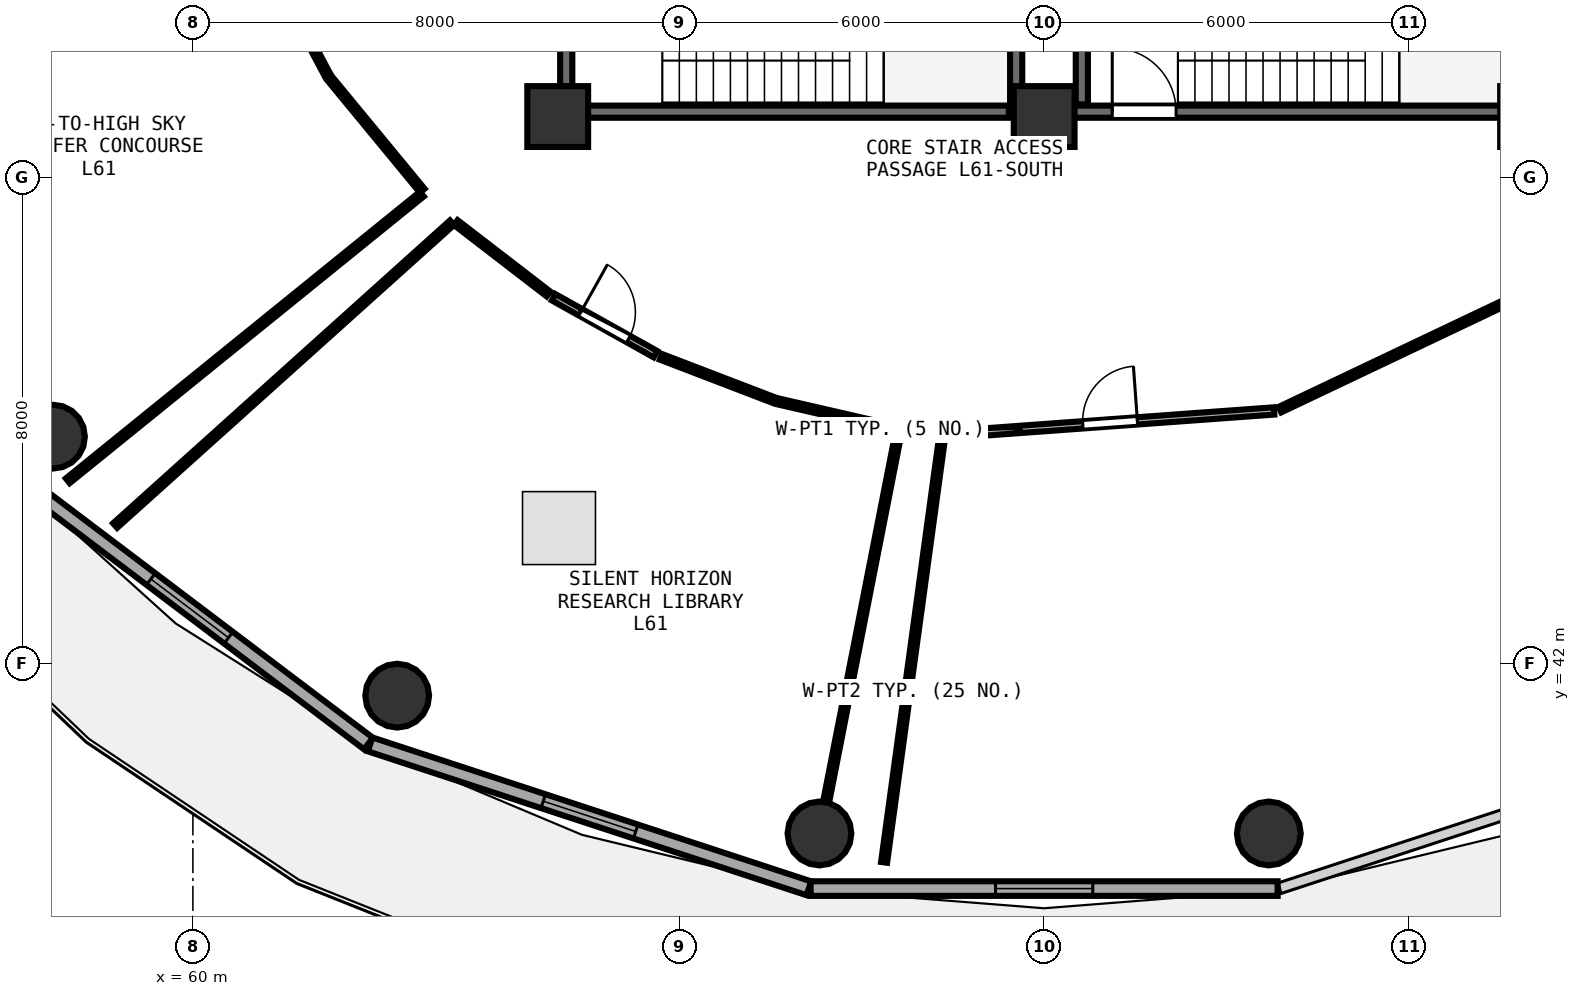
"""IFC4 building model, lengths in metres.
Left out: names, types, materials, properties, quantities, classifications, styles, units other than length and angle.
Written with IfcOpenShell. Run it as: python <this file> out.ifc"""

import sys

from ifc_helpers import new_model, si_unit, direction, frame, frame_2d, origin, origin_2d, place, context, subcontext, project, spatial, rectangle, circle, extrude, element, fill, save


model = new_model("IFC4")
c1 = context("Model", 3, precision=1e-05, world=origin(), true_north=direction((0.0, 1.0)))
c2 = subcontext(c1, "Body", "Model", "MODEL_VIEW")
j1 = project(units=[si_unit("LENGTHUNIT", "METRE"), si_unit("PLANEANGLEUNIT", "RADIAN")], contexts=[c1])
p1 = place(None, origin())
s1 = spatial("IfcSite", under=j1, at=p1, CompositionType="ELEMENT")
p2 = place(p1, origin())
s2 = spatial("IfcBuilding", under=s1, at=p2, CompositionType="ELEMENT")
p3 = place(p2, frame((0.0, 0.0, 238.2)))
s3 = spatial("IfcBuildingStorey", under=s2, at=p3, CompositionType="ELEMENT", Elevation=238.2)
for number, where, z_axis, x_axis in (
    (1, (66.0, 51.0, 0.0), (0.0, 0.0, 1.0), (1.0, 0.0, 0.0)),
    (2, (74.0, 51.0, 0.0), (0.0, 0.0, 1.0), (1.0, 0.0, 0.0)),
):
    element("IfcColumn", number, at=place(p3, frame(where, z_axis=z_axis, x_axis=x_axis)), inside=s3, PredefinedType="PILASTER", context=c2, shape_type="SweptSolid", body=[
        extrude(rectangle(XDim=1.0, YDim=1.0, at=origin_2d()), origin(), (0.0, 0.0, 1.0), 4.76),
    ])
for number, where, z_axis, x_axis in (
    (3, (57.698, 45.736, 0.0), (0.0, 0.0, 1.0), (1.0, 0.0, 0.0)),
    (4, (63.36, 41.476, 0.0), (0.0, 0.0, 1.0), (1.0, 0.0, 0.0)),
    (5, (70.305, 39.21, 0.0), (0.0, 0.0, 1.0), (1.0, 0.0, 0.0)),
    (6, (77.695, 39.21, 0.0), (0.0, 0.0, 1.0), (1.0, 0.0, 0.0)),
):
    element("IfcColumn", number, at=place(p3, frame(where, z_axis=z_axis, x_axis=x_axis)), inside=s3, PredefinedType="COLUMN", context=c2, shape_type="SweptSolid", body=[
        extrude(circle(Radius=0.525, at=origin_2d()), origin(), (0.0, 0.0, 1.0), 4.76),
    ])
p4 = place(p3, frame((57.006, 45.135, 0.0), z_axis=(0.0, 0.0, 1.0), x_axis=(0.797701674595, -0.603052268338, 0.0)))
e7 = element("IfcWall", 7, at=p4, inside=s3, PredefinedType="SOLIDWALL", context=c2, shape_type="SweptSolid", body=[
    extrude(rectangle(XDim=7.374, YDim=0.24, at=frame_2d((3.687, 0.0))), origin(), (0.0, 0.0, 1.0), 4.345),
])
p5 = place(p4, frame((2.887, 0.0, 0.85)))
e8 = element("IfcOpeningElement", 8, at=p5, cuts=e7, PredefinedType="OPENING", context=c2, shape_type="SweptSolid", body=[
    extrude(rectangle(XDim=1.6, YDim=1.45, at=frame_2d((0.8, 0.725))), frame((0.0, 0.13, 0.0), z_axis=(0.0, -1.0, 0.0), x_axis=(1.0, 0.0, 0.0)), (0.0, 0.0, 1.0), 0.26),
])
p6 = place(p3, frame((62.914, 40.675, 0.0), z_axis=(0.0, 0.0, 1.0), x_axis=(0.95022142767, -0.31157541366, 0.0)))
e9 = element("IfcWall", 9, at=p6, inside=s3, PredefinedType="SOLIDWALL", context=c2, shape_type="SweptSolid", body=[
    extrude(rectangle(XDim=7.594, YDim=0.24, at=frame_2d((3.797, 0.0))), origin(), (0.0, 0.0, 1.0), 4.345),
])
p7 = place(p6, frame((2.997, 0.0, 0.85)))
e10 = element("IfcOpeningElement", 10, at=p7, cuts=e9, PredefinedType="OPENING", context=c2, shape_type="SweptSolid", body=[
    extrude(rectangle(XDim=1.6, YDim=1.45, at=frame_2d((0.8, 0.725))), frame((0.0, 0.13, 0.0), z_axis=(0.0, -1.0, 0.0), x_axis=(1.0, 0.0, 0.0)), (0.0, 0.0, 1.0), 0.26),
])
p8 = place(p3, frame((70.16, 38.304, 0.0), z_axis=(0.0, 0.0, 1.0), x_axis=(1.0, 0.0, 0.0)))
e11 = element("IfcWall", 11, at=p8, inside=s3, PredefinedType="SOLIDWALL", context=c2, shape_type="SweptSolid", body=[
    extrude(rectangle(XDim=7.68, YDim=0.24, at=frame_2d((3.84, 0.0))), origin(), (0.0, 0.0, 1.0), 4.345),
])
p9 = place(p8, frame((3.04, 0.0, 0.85)))
e12 = element("IfcOpeningElement", 12, at=p9, cuts=e11, PredefinedType="OPENING", context=c2, shape_type="SweptSolid", body=[
    extrude(rectangle(XDim=1.6, YDim=1.45, at=frame_2d((0.8, 0.725))), frame((0.0, 0.13, 0.0), z_axis=(0.0, -1.0, 0.0), x_axis=(1.0, 0.0, 0.0)), (0.0, 0.0, 1.0), 0.26),
])
p10 = place(p3, frame((74.0, 51.08, 0.0), z_axis=(0.0, 0.0, 1.0), x_axis=(1.0, 0.0, 0.0)))
e13 = element("IfcWall", 13, at=p10, inside=s3, PredefinedType="SHEAR", context=c2, shape_type="SweptSolid", body=[
    extrude(rectangle(XDim=7.9, YDim=0.2, at=frame_2d((3.95, 0.0))), origin(), (0.0, 0.0, 1.0), 4.36),
])
p11 = place(p10, frame((1.12, 0.0, 0.0)))
e14 = element("IfcOpeningElement", 14, at=p11, cuts=e13, PredefinedType="OPENING", context=c2, shape_type="SweptSolid", body=[
    extrude(rectangle(XDim=1.05, YDim=2.1, at=frame_2d((0.525, 1.05))), frame((0.0, 0.11, 0.0), z_axis=(0.0, -1.0, 0.0), x_axis=(1.0, 0.0, 0.0)), (0.0, 0.0, 1.0), 0.22),
])
p12 = place(p3, frame((74.62, 54.27, 0.0), z_axis=(0.0, 0.0, 1.0), x_axis=(0.0, -1.0, 0.0)))
e15 = element("IfcWall", 15, at=p12, inside=s3, PredefinedType="SHEAR", context=c2, shape_type="SweptSolid", body=[
    extrude(rectangle(XDim=3.07, YDim=0.2, at=frame_2d((1.535, 0.0))), origin(), (0.0, 0.0, 1.0), 4.36),
])
p13 = place(p3, frame((66.26, 51.08, 0.0), z_axis=(0.0, 0.0, 1.0), x_axis=(1.0, 0.0, 0.0)))
e16 = element("IfcWall", 16, at=p13, inside=s3, PredefinedType="SHEAR", context=c2, shape_type="SweptSolid", body=[
    extrude(rectangle(XDim=7.16, YDim=0.2, at=frame_2d((3.58, 0.0))), origin(), (0.0, 0.0, 1.0), 4.36),
])
p14 = place(p3, frame((73.54, 51.2, 0.0), z_axis=(0.0, 0.0, 1.0), x_axis=(0.0, 1.0, 0.0)))
e17 = element("IfcWall", 17, at=p14, inside=s3, PredefinedType="SHEAR", context=c2, shape_type="SweptSolid", body=[
    extrude(rectangle(XDim=3.07, YDim=0.2, at=frame_2d((1.535, 0.0))), origin(), (0.0, 0.0, 1.0), 4.36),
])
p15 = place(p3, frame((66.14, 54.27, 0.0), z_axis=(0.0, 0.0, 1.0), x_axis=(0.0, -1.0, 0.0)))
e18 = element("IfcWall", 18, at=p15, inside=s3, PredefinedType="SHEAR", context=c2, shape_type="SweptSolid", body=[
    extrude(rectangle(XDim=3.07, YDim=0.2, at=frame_2d((1.535, 0.0))), origin(), (0.0, 0.0, 1.0), 4.36),
])
p16 = place(p15, frame((1.01, 0.0, 0.0)))
e19 = element("IfcOpeningElement", 19, at=p16, cuts=e18, PredefinedType="OPENING", context=c2, shape_type="SweptSolid", body=[
    extrude(rectangle(XDim=1.05, YDim=2.1, at=frame_2d((0.525, 1.05))), frame((0.0, 0.11, 0.0), z_axis=(0.0, -1.0, 0.0), x_axis=(1.0, 0.0, 0.0)), (0.0, 0.0, 1.0), 0.22),
])
p17 = place(p3, frame((65.933, 48.028, 0.0), z_axis=(0.0, 0.0, 1.0), x_axis=(0.873020002145, -0.487684401898, 0.0)))
e20 = element("IfcWall", 20, at=p17, inside=s3, PredefinedType="PARTITIONING", context=c2, shape_type="SweptSolid", body=[
    extrude(rectangle(XDim=1.918, YDim=0.12, at=frame_2d((0.959, 0.0))), origin(), (0.0, 0.0, 1.0), 2.345),
])
p18 = place(p17, frame((0.509, 0.0, 0.0)))
e21 = element("IfcOpeningElement", 21, at=p18, cuts=e20, PredefinedType="OPENING", context=c2, shape_type="SweptSolid", body=[
    extrude(rectangle(XDim=0.9, YDim=2.08, at=frame_2d((0.45, 1.04))), frame((0.0, 0.07, 0.0), z_axis=(0.0, -1.0, 0.0), x_axis=(1.0, 0.0, 0.0)), (0.0, 0.0, 1.0), 0.14),
])
p19 = place(p3, frame((72.387, 45.766, 0.0), z_axis=(0.0, 0.0, 1.0), x_axis=(0.997366707309, 0.072523452427, 0.0)))
e22 = element("IfcWall", 22, at=p19, inside=s3, PredefinedType="PARTITIONING", context=c2, shape_type="SweptSolid", body=[
    extrude(rectangle(XDim=5.41, YDim=0.12, at=frame_2d((2.705, 0.0))), origin(), (0.0, 0.0, 1.0), 2.345),
])
p20 = place(p19, frame((2.255, 0.0, 0.0)))
e23 = element("IfcOpeningElement", 23, at=p20, cuts=e22, PredefinedType="OPENING", context=c2, shape_type="SweptSolid", body=[
    extrude(rectangle(XDim=0.9, YDim=2.08, at=frame_2d((0.45, 1.04))), frame((0.0, 0.07, 0.0), z_axis=(0.0, -1.0, 0.0), x_axis=(1.0, 0.0, 0.0)), (0.0, 0.0, 1.0), 0.14),
])
p21 = place(p3, frame((61.117, 53.748, 0.0), z_axis=(0.0, 0.0, 1.0), x_axis=(0.469073693437, -0.883159028785, 0.0)))
e24 = element("IfcWall", 24, at=p21, inside=s3, PredefinedType="PARTITIONING", context=c2, shape_type="SweptSolid", body=[
    extrude(rectangle(XDim=2.335, YDim=0.1, at=frame_2d((1.168, 0.0))), origin(), (0.0, 0.0, 1.0), 2.345),
])
p22 = place(p3, frame((62.256, 51.619, 0.0), z_axis=(0.0, 0.0, 1.0), x_axis=(0.636052062508, -0.771646145444, 0.0)))
e25 = element("IfcWall", 25, at=p22, inside=s3, PredefinedType="PARTITIONING", context=c2, shape_type="SweptSolid", body=[
    extrude(rectangle(XDim=2.382, YDim=0.1, at=frame_2d((1.191, 0.0))), origin(), (0.0, 0.0, 1.0), 2.345),
])
p23 = place(p3, frame((63.766, 49.725, 0.0), z_axis=(0.0, 0.0, 1.0), x_axis=(-0.777235006442, -0.629210413742, 0.0)))
e26 = element("IfcWall", 26, at=p23, inside=s3, PredefinedType="PARTITIONING", context=c2, shape_type="SweptSolid", body=[
    extrude(rectangle(XDim=7.493, YDim=0.1, at=frame_2d((3.747, 0.0))), origin(), (0.0, 0.0, 1.0), 2.345),
])
p24 = place(p3, frame((64.323, 49.257, 0.0), z_axis=(0.0, 0.0, 1.0), x_axis=(0.792378964909, -0.610029159934, 0.0)))
e27 = element("IfcWall", 27, at=p24, inside=s3, PredefinedType="PARTITIONING", context=c2, shape_type="SweptSolid", body=[
    extrude(rectangle(XDim=1.927, YDim=0.1, at=frame_2d((0.963, 0.0))), origin(), (0.0, 0.0, 1.0), 2.345),
])
p25 = place(p3, frame((67.697, 47.049, 0.0), z_axis=(0.0, 0.0, 1.0), x_axis=(0.933735149574, -0.357964621786, 0.0)))
e28 = element("IfcWall", 28, at=p25, inside=s3, PredefinedType="PARTITIONING", context=c2, shape_type="SweptSolid", body=[
    extrude(rectangle(XDim=1.984, YDim=0.1, at=frame_2d((0.992, 0.0))), origin(), (0.0, 0.0, 1.0), 4.35),
])
p26 = place(p3, frame((69.626, 46.315, 0.0), z_axis=(0.0, 0.0, 1.0), x_axis=(0.974526673994, -0.224271624762, 0.0)))
e29 = element("IfcWall", 29, at=p26, inside=s3, PredefinedType="PARTITIONING", context=c2, shape_type="SweptSolid", body=[
    extrude(rectangle(XDim=2.002, YDim=0.1, at=frame_2d((1.001, 0.0))), origin(), (0.0, 0.0, 1.0), 4.35),
])
p27 = place(p3, frame((71.608, 45.818, 0.0), z_axis=(0.0, 0.0, 1.0), x_axis=(-0.19242564028, -0.981311557541, 0.0)))
e30 = element("IfcWall", 30, at=p27, inside=s3, PredefinedType="PARTITIONING", context=c2, shape_type="SweptSolid", body=[
    extrude(rectangle(XDim=6.185, YDim=0.1, at=frame_2d((3.093, 0.0))), origin(), (0.0, 0.0, 1.0), 2.345),
])
p28 = place(p3, frame((58.721, 44.274, 0.0), z_axis=(0.0, 0.0, 1.0), x_axis=(0.743678571083, 0.668537345936, 0.0)))
e31 = element("IfcWall", 31, at=p28, inside=s3, PredefinedType="PARTITIONING", context=c2, shape_type="SweptSolid", body=[
    extrude(rectangle(XDim=7.45, YDim=0.1, at=frame_2d((3.725, 0.0))), origin(), (0.0, 0.0, 1.0), 2.345),
])
p29 = place(p3, frame((77.878, 46.18, 0.0), z_axis=(0.0, 0.0, 1.0), x_axis=(0.903304994033, 0.428998936775, 0.0)))
e32 = element("IfcWall", 32, at=p29, inside=s3, PredefinedType="PARTITIONING", context=c2, shape_type="SweptSolid", body=[
    extrude(rectangle(XDim=5.335, YDim=0.1, at=frame_2d((2.667, 0.0))), origin(), (0.0, 0.0, 1.0), 2.345),
])
p30 = place(p3, frame((71.367, 38.735, 0.0), z_axis=(0.0, 0.0, 1.0), x_axis=(0.135283127844, 0.990806981869, 0.0)))
e33 = element("IfcWall", 33, at=p30, inside=s3, PredefinedType="PARTITIONING", context=c2, shape_type="SweptSolid", body=[
    extrude(rectangle(XDim=7.053, YDim=0.1, at=frame_2d((3.526, 0.0))), origin(), (0.0, 0.0, 1.0), 2.345),
])
p31 = place(p5, origin())
e34 = element("IfcWindow", 34, at=p31, inside=s3, PartitioningType="SINGLE_PANEL", PredefinedType="WINDOW", context=c2, shape_type="SweptSolid", body=[
    extrude(rectangle(XDim=1.6, YDim=1.45, at=frame_2d((0.8, 0.725))), frame((0.0, 0.03, 0.0), z_axis=(0.0, -1.0, 0.0), x_axis=(1.0, 0.0, 0.0)), (0.0, 0.0, 1.0), 0.06),
])
fill(e8, e34)
p32 = place(p7, origin())
e35 = element("IfcWindow", 35, at=p32, inside=s3, PartitioningType="SINGLE_PANEL", PredefinedType="WINDOW", context=c2, shape_type="SweptSolid", body=[
    extrude(rectangle(XDim=1.6, YDim=1.45, at=frame_2d((0.8, 0.725))), frame((0.0, 0.03, 0.0), z_axis=(0.0, -1.0, 0.0), x_axis=(1.0, 0.0, 0.0)), (0.0, 0.0, 1.0), 0.06),
])
fill(e10, e35)
p33 = place(p9, origin())
e36 = element("IfcWindow", 36, at=p33, inside=s3, PartitioningType="SINGLE_PANEL", PredefinedType="WINDOW", context=c2, shape_type="SweptSolid", body=[
    extrude(rectangle(XDim=1.6, YDim=1.45, at=frame_2d((0.8, 0.725))), frame((0.0, 0.03, 0.0), z_axis=(0.0, -1.0, 0.0), x_axis=(1.0, 0.0, 0.0)), (0.0, 0.0, 1.0), 0.06),
])
fill(e12, e36)
p34 = place(p11, origin())
e37 = element("IfcDoor", 37, at=p34, inside=s3, OperationType="SINGLE_SWING_LEFT", PredefinedType="DOOR", context=c2, shape_type="SweptSolid", body=[
    extrude(rectangle(XDim=1.05, YDim=2.1, at=frame_2d((0.525, 1.05))), frame((0.0, 0.025, 0.0), z_axis=(0.0, -1.0, 0.0), x_axis=(1.0, 0.0, 0.0)), (0.0, 0.0, 1.0), 0.05),
])
fill(e14, e37)
p35 = place(p18, origin())
e38 = element("IfcDoor", 38, at=p35, inside=s3, OperationType="SINGLE_SWING_LEFT", PredefinedType="DOOR", context=c2, shape_type="SweptSolid", body=[
    extrude(rectangle(XDim=0.9, YDim=2.08, at=frame_2d((0.45, 1.04))), frame((0.0, 0.025, 0.0), z_axis=(0.0, -1.0, 0.0), x_axis=(1.0, 0.0, 0.0)), (0.0, 0.0, 1.0), 0.05),
])
fill(e21, e38)
p36 = place(p20, origin())
e39 = element("IfcDoor", 39, at=p36, inside=s3, OperationType="SINGLE_SWING_RIGHT", PredefinedType="DOOR", context=c2, shape_type="SweptSolid", body=[
    extrude(rectangle(XDim=0.9, YDim=2.08, at=frame_2d((0.45, 1.04))), frame((0.0, 0.025, 0.0), z_axis=(0.0, -1.0, 0.0), x_axis=(1.0, 0.0, 0.0)), (0.0, 0.0, 1.0), 0.05),
])
fill(e23, e39)
save(model, sys.argv[1])
